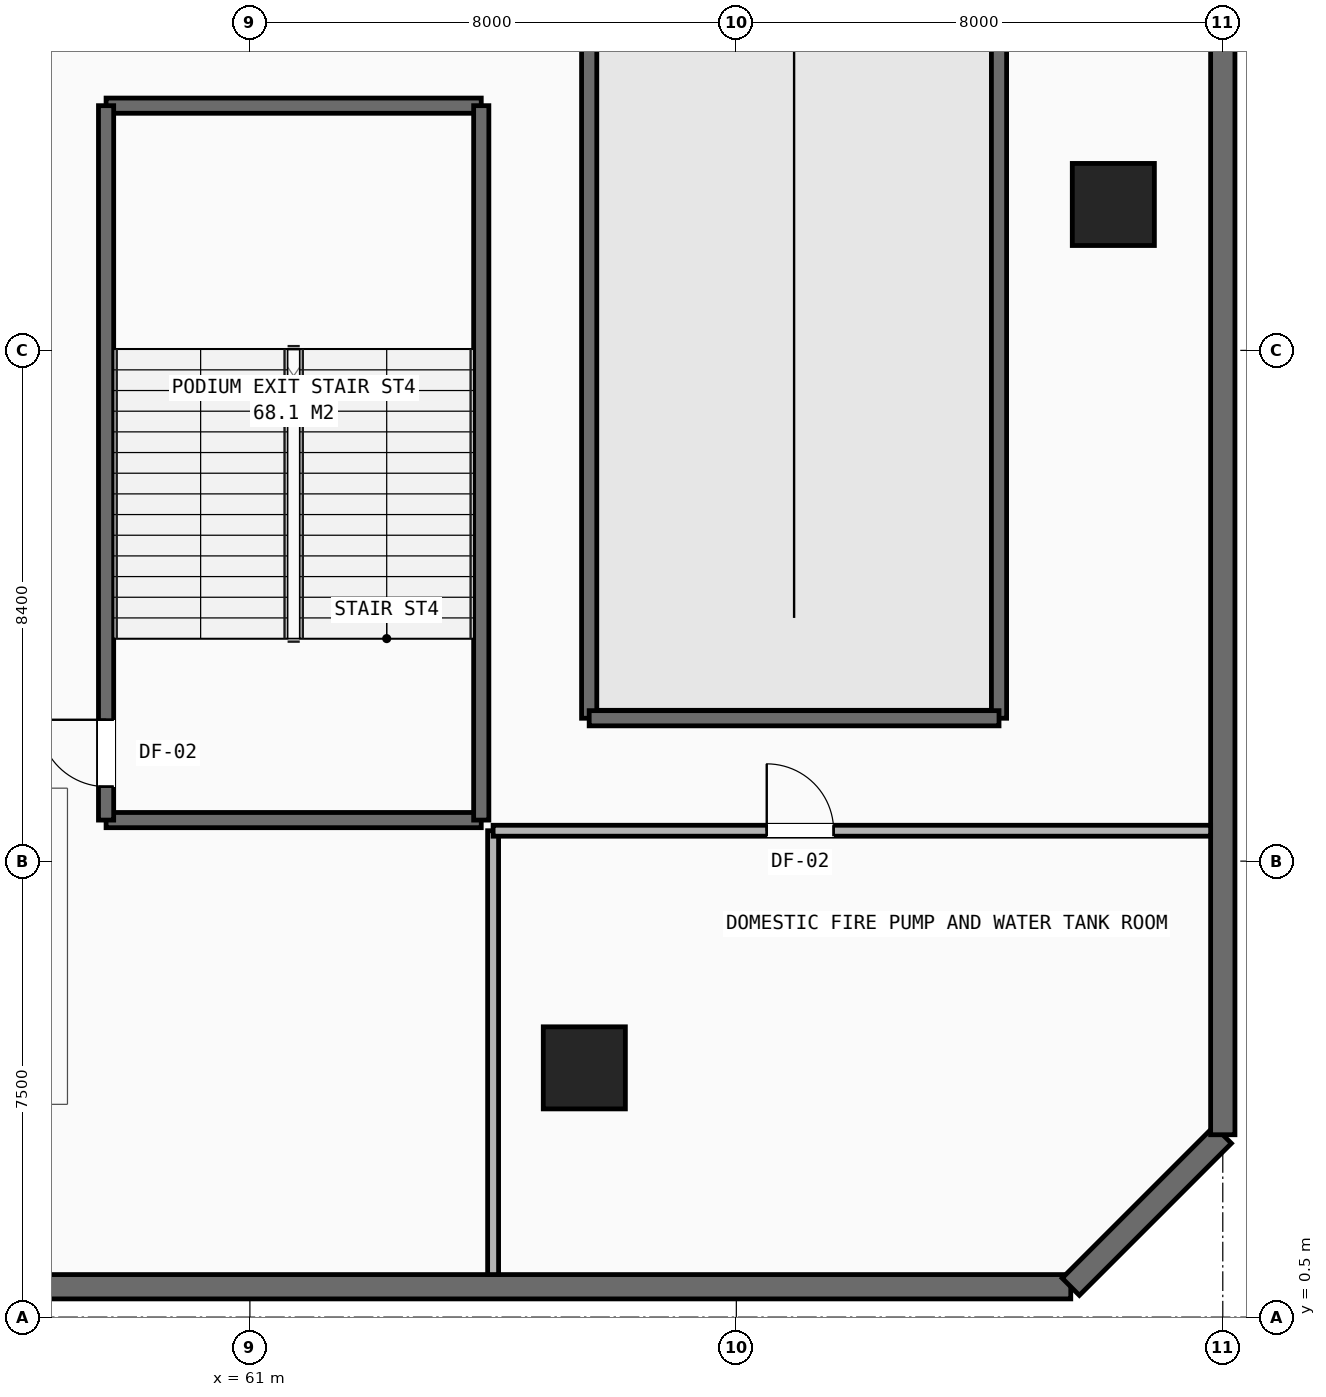
"""IFC4 building model, lengths in metres.
Left out: names, types, materials, properties, quantities, classifications, styles, units other than length and angle.
Written with IfcOpenShell. Run it as: python <this file> out.ifc"""

import sys

from ifc_helpers import new_model, si_unit, direction, frame, frame_2d, origin, origin_2d, place, context, subcontext, project, spatial, rectangle, hollow_rectangle, extrude, element, fill, save


model = new_model("IFC4")
c1 = context("Model", 3, precision=1e-05, world=origin(), true_north=direction((0.0, 1.0)))
c2 = subcontext(c1, "Body", "Model", "MODEL_VIEW")
j1 = project(units=[si_unit("LENGTHUNIT", "METRE"), si_unit("PLANEANGLEUNIT", "RADIAN")], contexts=[c1])
p1 = place(None, origin())
s1 = spatial("IfcSite", under=j1, at=p1, CompositionType="ELEMENT")
p2 = place(p1, origin())
s2 = spatial("IfcBuilding", under=s1, at=p2, CompositionType="ELEMENT")
p3 = place(p2, frame((0.0, 0.0, -5.0)))
s3 = spatial("IfcBuildingStorey", under=s2, at=p3, CompositionType="ELEMENT", Elevation=-5.0)
for number, where, z_axis, x_axis in (
    (1, (66.5, 4.6, 0.0), (0.0, 0.0, 1.0), (1.0, 0.0, 0.0)),
    (2, (75.2, 18.8, 0.0), (0.0, 0.0, 1.0), (1.0, 0.0, 0.0)),
):
    element("IfcColumn", number, at=place(p3, frame(where, z_axis=z_axis, x_axis=x_axis)), inside=s3, PredefinedType="COLUMN", context=c2, shape_type="SweptSolid", body=[
        extrude(hollow_rectangle(XDim=1.35, YDim=1.35, WallThickness=0.085, at=origin_2d()), origin(), (0.0, 0.0, 1.0), 5.0),
    ])
p4 = place(p3, frame((5.5, 1.0, 0.0), z_axis=(0.0, 0.0, 1.0), x_axis=(1.0, 0.0, 0.0)))
e3 = element("IfcWall", 3, at=p4, inside=s3, PredefinedType="USERDEFINED", context=c2, shape_type="SweptSolid", body=[
    extrude(rectangle(XDim=69.0, YDim=0.4, at=frame_2d((34.5, 0.0))), origin(), (0.0, 0.0, 1.0), 4.65),
])
p5 = place(p3, frame((74.5, 1.0, 0.0), z_axis=(0.0, 0.0, 1.0), x_axis=(0.707106781187, 0.707106781187, 0.0)))
e4 = element("IfcWall", 4, at=p5, inside=s3, PredefinedType="USERDEFINED", context=c2, shape_type="SweptSolid", body=[
    extrude(rectangle(XDim=3.536, YDim=0.4, at=frame_2d((1.768, 0.0))), origin(), (0.0, 0.0, 1.0), 4.65),
])
p6 = place(p3, frame((77.0, 3.5, 0.0), z_axis=(0.0, 0.0, 1.0), x_axis=(0.0, 1.0, 0.0)))
e5 = element("IfcWall", 5, at=p6, inside=s3, PredefinedType="USERDEFINED", context=c2, shape_type="SweptSolid", body=[
    extrude(rectangle(XDim=48.0, YDim=0.4, at=frame_2d((24.0, 0.0))), origin(), (0.0, 0.0, 1.0), 4.65),
])
for number, where, z_axis, x_axis in (
    (6, (58.635, 20.425, 0.0), (0.0, 0.0, 1.0), (1.0, 0.0, 0.0)),
    (7, (58.635, 8.675, 0.0), (0.0, 0.0, 1.0), (1.0, 0.0, 0.0)),
):
    element("IfcWall", number, at=place(p3, frame(where, z_axis=z_axis, x_axis=x_axis)), inside=s3, PredefinedType="SHEAR", context=c2, shape_type="SweptSolid", body=[
        extrude(rectangle(XDim=6.17, YDim=0.25, at=frame_2d((3.085, 0.0))), origin(), (0.0, 0.0, 1.0), 4.65),
    ])
p7 = place(p3, frame((58.635, 8.675, 0.0), z_axis=(0.0, 0.0, 1.0), x_axis=(0.0, 1.0, 0.0)))
e8 = element("IfcWall", 8, at=p7, inside=s3, PredefinedType="SHEAR", context=c2, shape_type="SweptSolid", body=[
    extrude(rectangle(XDim=11.75, YDim=0.25, at=frame_2d((5.875, 0.0))), origin(), (0.0, 0.0, 1.0), 4.65),
])
p8 = place(p7, frame((0.55, 0.0, 0.0)))
e9 = element("IfcOpeningElement", 9, at=p8, cuts=e8, PredefinedType="OPENING", context=c2, shape_type="SweptSolid", body=[
    extrude(rectangle(XDim=1.1, YDim=2.15, at=frame_2d((0.55, 1.075))), frame((0.0, 0.135, 0.0), z_axis=(0.0, -1.0, 0.0), x_axis=(1.0, 0.0, 0.0)), (0.0, 0.0, 1.0), 0.27),
])
p9 = place(p3, frame((64.805, 8.675, 0.0), z_axis=(0.0, 0.0, 1.0), x_axis=(0.0, 1.0, 0.0)))
e10 = element("IfcWall", 10, at=p9, inside=s3, PredefinedType="SHEAR", context=c2, shape_type="SweptSolid", body=[
    extrude(rectangle(XDim=11.75, YDim=0.25, at=frame_2d((5.875, 0.0))), origin(), (0.0, 0.0, 1.0), 4.65),
])
for number, where, z_axis, x_axis in (
    (11, (66.58, 10.35, 0.0), (0.0, 0.0, 1.0), (0.0, 1.0, 0.0)),
    (12, (73.32, 10.35, 0.0), (0.0, 0.0, 1.0), (0.0, 1.0, 0.0)),
):
    element("IfcWall", number, at=place(p3, frame(where, z_axis=z_axis, x_axis=x_axis)), inside=s3, PredefinedType="SHEAR", context=c2, shape_type="SweptSolid", body=[
        extrude(rectangle(XDim=40.1, YDim=0.25, at=frame_2d((20.05, 0.0))), origin(), (0.0, 0.0, 1.0), 4.65),
    ])
p10 = place(p3, frame((66.58, 10.35, 0.0), z_axis=(0.0, 0.0, 1.0), x_axis=(1.0, 0.0, 0.0)))
e13 = element("IfcWall", 13, at=p10, inside=s3, PredefinedType="SHEAR", context=c2, shape_type="SweptSolid", body=[
    extrude(rectangle(XDim=6.74, YDim=0.25, at=frame_2d((3.37, 0.0))), origin(), (0.0, 0.0, 1.0), 4.65),
])
p11 = place(p3, frame((65.0, 1.2, 0.0), z_axis=(0.0, 0.0, 1.0), x_axis=(0.0, 1.0, 0.0)))
e14 = element("IfcWall", 14, at=p11, inside=s3, PredefinedType="PARTITIONING", context=c2, shape_type="SweptSolid", body=[
    extrude(rectangle(XDim=7.3, YDim=0.18, at=frame_2d((3.65, 0.0))), origin(), (0.0, 0.0, 1.0), 3.861),
])
p12 = place(p3, frame((65.0, 8.5, 0.0), z_axis=(0.0, 0.0, 1.0), x_axis=(1.0, 0.0, 0.0)))
e15 = element("IfcWall", 15, at=p12, inside=s3, PredefinedType="PARTITIONING", context=c2, shape_type="SweptSolid", body=[
    extrude(rectangle(XDim=11.8, YDim=0.18, at=frame_2d((5.9, 0.0))), origin(), (0.0, 0.0, 1.0), 3.861),
])
p13 = place(p12, frame((4.5, 0.0, 0.0)))
e16 = element("IfcOpeningElement", 16, at=p13, cuts=e15, PredefinedType="OPENING", context=c2, shape_type="SweptSolid", body=[
    extrude(rectangle(XDim=1.1, YDim=2.15, at=frame_2d((0.55, 1.075))), frame((0.0, 0.1, 0.0), z_axis=(0.0, -1.0, 0.0), x_axis=(1.0, 0.0, 0.0)), (0.0, 0.0, 1.0), 0.2),
])
p14 = place(p13, origin())
e17 = element("IfcDoor", 17, at=p14, inside=s3, OperationType="SINGLE_SWING_LEFT", PredefinedType="DOOR", context=c2, shape_type="SweptSolid", body=[
    extrude(rectangle(XDim=1.1, YDim=2.15, at=frame_2d((0.55, 1.075))), frame((0.0, 0.025, 0.0), z_axis=(0.0, -1.0, 0.0), x_axis=(1.0, 0.0, 0.0)), (0.0, 0.0, 1.0), 0.05),
])
fill(e16, e17)
p15 = place(p8, origin())
e18 = element("IfcDoor", 18, at=p15, inside=s3, OperationType="SINGLE_SWING_RIGHT", PredefinedType="DOOR", context=c2, shape_type="SweptSolid", body=[
    extrude(rectangle(XDim=1.1, YDim=2.15, at=frame_2d((0.55, 1.075))), frame((0.0, 0.025, 0.0), z_axis=(0.0, -1.0, 0.0), x_axis=(1.0, 0.0, 0.0)), (0.0, 0.0, 1.0), 0.05),
])
fill(e9, e18)
save(model, sys.argv[1])
